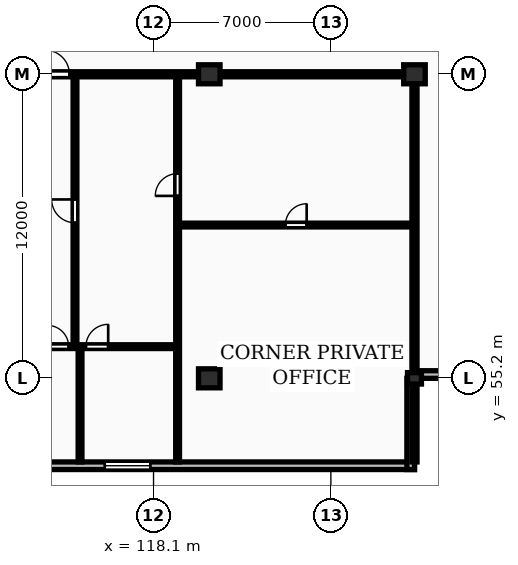
"""IFC4 building model, lengths in metres.
Left out: names, types, materials, properties, quantities, classifications, styles, units other than length and angle.
Written with IfcOpenShell. Run it as: python <this file> out.ifc"""

import sys

from ifc_helpers import new_model, si_unit, direction, frame, frame_2d, origin, origin_2d, place, context, subcontext, project, spatial, rectangle, extrude, element, fill, save


model = new_model("IFC4")
c1 = context("Model", 3, precision=1e-05, world=origin(), true_north=direction((0.0, 1.0)))
c2 = subcontext(c1, "Body", "Model", "MODEL_VIEW")
j1 = project(units=[si_unit("LENGTHUNIT", "METRE"), si_unit("PLANEANGLEUNIT", "RADIAN")], contexts=[c1])
p1 = place(None, origin())
s1 = spatial("IfcSite", under=j1, at=p1, CompositionType="ELEMENT")
p2 = place(p1, origin())
s2 = spatial("IfcBuilding", under=s1, at=p2, CompositionType="ELEMENT")
p3 = place(p2, frame((0.0, 0.0, 210.85)))
s3 = spatial("IfcBuildingStorey", under=s2, at=p3, CompositionType="ELEMENT", Elevation=210.85)
for number, where, z_axis, x_axis in (
    (1, (120.3, 55.2, 0.0), (0.0, 0.0, 1.0), (1.0, 0.0, 0.0)),
    (2, (120.3, 67.2, 0.0), (0.0, 0.0, 1.0), (1.0, 0.0, 0.0)),
):
    element("IfcColumn", number, at=place(p3, frame(where, z_axis=z_axis, x_axis=x_axis)), inside=s3, PredefinedType="COLUMN", context=c2, shape_type="SweptSolid", body=[
        extrude(rectangle(XDim=0.85, YDim=0.75, at=origin_2d()), origin(), (0.0, 0.0, 1.0), 3.25),
    ])
p4 = place(p3, frame((128.4, 55.2, 0.0), z_axis=(0.0, 0.0, 1.0), x_axis=(1.0, 0.0, 0.0)))
e3 = element("IfcColumn", 3, at=p4, inside=s3, PredefinedType="PILASTER", context=c2, shape_type="SweptSolid", body=[
    extrude(rectangle(XDim=0.55, YDim=0.45, at=origin_2d()), origin(), (0.0, 0.0, 1.0), 3.25),
])
p5 = place(p3, frame((128.4, 67.2, 0.0), z_axis=(0.0, 0.0, 1.0), x_axis=(1.0, 0.0, 0.0)))
e4 = element("IfcColumn", 4, at=p5, inside=s3, PredefinedType="COLUMN", context=c2, shape_type="SweptSolid", body=[
    extrude(rectangle(XDim=0.85, YDim=0.75, at=origin_2d()), origin(), (0.0, 0.0, 1.0), 3.25),
])
p6 = place(p3, frame((59.8, 51.75, 0.0), z_axis=(0.0, 0.0, 1.0), x_axis=(1.0, 0.0, 0.0)))
e5 = element("IfcWall", 5, at=p6, inside=s3, PredefinedType="STANDARD", context=c2, shape_type="SweptSolid", body=[
    extrude(rectangle(XDim=68.6, YDim=0.3, at=frame_2d((34.3, 0.0))), origin(), (0.0, 0.0, 1.0), 2.97),
])
p7 = place(p6, frame((13.025, 0.0, 0.85)))
e6 = element("IfcOpeningElement", 6, at=p7, cuts=e5, PredefinedType="OPENING", context=c2, shape_type="SweptSolid", body=[
    extrude(rectangle(XDim=1.8, YDim=1.8, at=frame_2d((0.9, 0.9))), frame((0.0, 0.16, 0.0), z_axis=(0.0, -1.0, 0.0), x_axis=(1.0, 0.0, 0.0)), (0.0, 0.0, 1.0), 0.32),
])
p8 = place(p6, frame((56.375, 0.0, 0.85)))
e7 = element("IfcOpeningElement", 7, at=p8, cuts=e5, PredefinedType="OPENING", context=c2, shape_type="SweptSolid", body=[
    extrude(rectangle(XDim=1.8, YDim=1.8, at=frame_2d((0.9, 0.9))), frame((0.0, 0.16, 0.0), z_axis=(0.0, -1.0, 0.0), x_axis=(1.0, 0.0, 0.0)), (0.0, 0.0, 1.0), 0.32),
])
p9 = place(p3, frame((128.25, 51.6, 0.0), z_axis=(0.0, 0.0, 1.0), x_axis=(0.0, 1.0, 0.0)))
e8 = element("IfcWall", 8, at=p9, inside=s3, PredefinedType="STANDARD", context=c2, shape_type="SweptSolid", body=[
    extrude(rectangle(XDim=3.6, YDim=0.3, at=frame_2d((1.8, 0.0))), origin(), (0.0, 0.0, 1.0), 2.97),
])
p10 = place(p3, frame((128.4, 55.35, 0.0), z_axis=(0.0, 0.0, 1.0), x_axis=(1.0, 0.0, 0.0)))
e9 = element("IfcWall", 9, at=p10, inside=s3, PredefinedType="STANDARD", context=c2, shape_type="SweptSolid", body=[
    extrude(rectangle(XDim=3.6, YDim=0.3, at=frame_2d((1.8, 0.0))), origin(), (0.0, 0.0, 1.0), 2.97),
])
p11 = place(p3, frame((128.4, 51.9, 0.0), z_axis=(0.0, 0.0, 1.0), x_axis=(0.0, 1.0, 0.0)))
e10 = element("IfcWall", 10, at=p11, inside=s3, PredefinedType="PARTITIONING", context=c2, shape_type="SweptSolid", body=[
    extrude(rectangle(XDim=15.3, YDim=0.2, at=frame_2d((7.65, 0.0))), origin(), (0.0, 0.0, 1.0), 2.277),
])
p12 = place(p3, frame((119.05, 61.25, 0.0), z_axis=(0.0, 0.0, 1.0), x_axis=(1.0, 0.0, 0.0)))
e11 = element("IfcWall", 11, at=p12, inside=s3, PredefinedType="PARTITIONING", context=c2, shape_type="SweptSolid", body=[
    extrude(rectangle(XDim=9.35, YDim=0.15, at=frame_2d((4.675, 0.0))), origin(), (0.0, 0.0, 1.0), 2.97),
])
p13 = place(p12, frame((4.255, 0.0, 0.0)))
e12 = element("IfcOpeningElement", 12, at=p13, cuts=e11, PredefinedType="OPENING", context=c2, shape_type="SweptSolid", body=[
    extrude(rectangle(XDim=0.84, YDim=2.04, at=frame_2d((0.42, 1.02))), frame((0.0, 0.085, 0.0), z_axis=(0.0, -1.0, 0.0), x_axis=(1.0, 0.0, 0.0)), (0.0, 0.0, 1.0), 0.17),
])
p14 = place(p3, frame((119.05, 51.9, 0.0), z_axis=(0.0, 0.0, 1.0), x_axis=(0.0, 1.0, 0.0)))
e13 = element("IfcWall", 13, at=p14, inside=s3, PredefinedType="PARTITIONING", context=c2, shape_type="SweptSolid", body=[
    extrude(rectangle(XDim=15.25, YDim=0.15, at=frame_2d((7.625, 0.0))), origin(), (0.0, 0.0, 1.0), 2.97),
])
p15 = place(p14, frame((10.5, 0.0, 0.0)))
e14 = element("IfcOpeningElement", 14, at=p15, cuts=e13, PredefinedType="OPENING", context=c2, shape_type="SweptSolid", body=[
    extrude(rectangle(XDim=0.88, YDim=2.06, at=frame_2d((0.44, 1.03))), frame((0.0, 0.085, 0.0), z_axis=(0.0, -1.0, 0.0), x_axis=(1.0, 0.0, 0.0)), (0.0, 0.0, 1.0), 0.17),
])
p16 = place(p3, frame((115.0, 56.45, 0.0), z_axis=(0.0, 0.0, 1.0), x_axis=(0.0, 1.0, 0.0)))
e15 = element("IfcWall", 15, at=p16, inside=s3, PredefinedType="PARTITIONING", context=c2, shape_type="SweptSolid", body=[
    extrude(rectangle(XDim=10.7, YDim=0.15, at=frame_2d((5.35, 0.0))), origin(), (0.0, 0.0, 1.0), 2.97),
])
p17 = place(p16, frame((4.89, 0.0, 0.0)))
e16 = element("IfcOpeningElement", 16, at=p17, cuts=e15, PredefinedType="OPENING", context=c2, shape_type="SweptSolid", body=[
    extrude(rectangle(XDim=0.92, YDim=2.08, at=frame_2d((0.46, 1.04))), frame((0.0, 0.085, 0.0), z_axis=(0.0, -1.0, 0.0), x_axis=(1.0, 0.0, 0.0)), (0.0, 0.0, 1.0), 0.17),
])
p18 = place(p3, frame((115.2, 51.9, 0.0), z_axis=(0.0, 0.0, 1.0), x_axis=(0.0, 1.0, 0.0)))
e17 = element("IfcWall", 17, at=p18, inside=s3, PredefinedType="PARTITIONING", context=c2, shape_type="SweptSolid", body=[
    extrude(rectangle(XDim=4.55, YDim=0.15, at=frame_2d((2.275, 0.0))), origin(), (0.0, 0.0, 1.0), 2.97),
])
p19 = place(p3, frame((112.27, 56.45, 0.0), z_axis=(0.0, 0.0, 1.0), x_axis=(1.0, 0.0, 0.0)))
e18 = element("IfcWall", 18, at=p19, inside=s3, PredefinedType="PARTITIONING", context=c2, shape_type="SweptSolid", body=[
    extrude(rectangle(XDim=6.76, YDim=0.15, at=frame_2d((3.38, 0.0))), origin(), (0.0, 0.0, 1.0), 2.97),
])
p20 = place(p19, frame((1.64, 0.0, 0.0)))
e19 = element("IfcOpeningElement", 19, at=p20, cuts=e18, PredefinedType="OPENING", context=c2, shape_type="SweptSolid", body=[
    extrude(rectangle(XDim=0.84, YDim=2.04, at=frame_2d((0.42, 1.02))), frame((0.0, 0.085, 0.0), z_axis=(0.0, -1.0, 0.0), x_axis=(1.0, 0.0, 0.0)), (0.0, 0.0, 1.0), 0.17),
])
p21 = place(p19, frame((3.16, 0.0, 0.0)))
e20 = element("IfcOpeningElement", 20, at=p21, cuts=e18, PredefinedType="OPENING", context=c2, shape_type="SweptSolid", body=[
    extrude(rectangle(XDim=0.88, YDim=2.06, at=frame_2d((0.44, 1.03))), frame((0.0, 0.085, 0.0), z_axis=(0.0, -1.0, 0.0), x_axis=(1.0, 0.0, 0.0)), (0.0, 0.0, 1.0), 0.17),
])
p22 = place(p3, frame((112.25, 67.2, 0.0), z_axis=(0.0, 0.0, 1.0), x_axis=(1.0, 0.0, 0.0)))
e21 = element("IfcWall", 21, at=p22, inside=s3, PredefinedType="PARTITIONING", context=c2, shape_type="SweptSolid", body=[
    extrude(rectangle(XDim=16.15, YDim=0.2, at=frame_2d((8.075, 0.0))), origin(), (0.0, 0.0, 1.0), 2.433),
])
p23 = place(p22, frame((1.58, 0.0, 0.0)))
e22 = element("IfcOpeningElement", 22, at=p23, cuts=e21, PredefinedType="OPENING", context=c2, shape_type="SweptSolid", body=[
    extrude(rectangle(XDim=0.95, YDim=2.15, at=frame_2d((0.475, 1.075))), frame((0.0, 0.11, 0.0), z_axis=(0.0, -1.0, 0.0), x_axis=(1.0, 0.0, 0.0)), (0.0, 0.0, 1.0), 0.22),
])
p24 = place(p8, origin())
e23 = element("IfcWindow", 23, at=p24, inside=s3, PartitioningType="SINGLE_PANEL", PredefinedType="WINDOW", context=c2, shape_type="SweptSolid", body=[
    extrude(rectangle(XDim=1.8, YDim=1.8, at=frame_2d((0.9, 0.9))), frame((0.0, 0.03, 0.0), z_axis=(0.0, -1.0, 0.0), x_axis=(1.0, 0.0, 0.0)), (0.0, 0.0, 1.0), 0.06),
])
fill(e7, e23)
p25 = place(p13, origin())
e24 = element("IfcDoor", 24, at=p25, inside=s3, OperationType="SINGLE_SWING_RIGHT", PredefinedType="DOOR", context=c2, shape_type="SweptSolid", body=[
    extrude(rectangle(XDim=0.84, YDim=2.04, at=frame_2d((0.42, 1.02))), frame((0.0, 0.025, 0.0), z_axis=(0.0, -1.0, 0.0), x_axis=(1.0, 0.0, 0.0)), (0.0, 0.0, 1.0), 0.05),
])
fill(e12, e24)
p26 = place(p15, origin())
e25 = element("IfcDoor", 25, at=p26, inside=s3, OperationType="SINGLE_SWING_LEFT", PredefinedType="DOOR", context=c2, shape_type="SweptSolid", body=[
    extrude(rectangle(XDim=0.88, YDim=2.06, at=frame_2d((0.44, 1.03))), frame((0.0, 0.025, 0.0), z_axis=(0.0, -1.0, 0.0), x_axis=(1.0, 0.0, 0.0)), (0.0, 0.0, 1.0), 0.05),
])
fill(e14, e25)
p27 = place(p17, origin())
e26 = element("IfcDoor", 26, at=p27, inside=s3, OperationType="SINGLE_SWING_RIGHT", PredefinedType="DOOR", context=c2, shape_type="SweptSolid", body=[
    extrude(rectangle(XDim=0.92, YDim=2.08, at=frame_2d((0.46, 1.04))), frame((0.0, 0.025, 0.0), z_axis=(0.0, -1.0, 0.0), x_axis=(1.0, 0.0, 0.0)), (0.0, 0.0, 1.0), 0.05),
])
fill(e16, e26)
p28 = place(p20, origin())
e27 = element("IfcDoor", 27, at=p28, inside=s3, OperationType="SINGLE_SWING_LEFT", PredefinedType="DOOR", context=c2, shape_type="SweptSolid", body=[
    extrude(rectangle(XDim=0.84, YDim=2.04, at=frame_2d((0.42, 1.02))), frame((0.0, 0.025, 0.0), z_axis=(0.0, -1.0, 0.0), x_axis=(1.0, 0.0, 0.0)), (0.0, 0.0, 1.0), 0.05),
])
fill(e19, e27)
p29 = place(p21, origin())
e28 = element("IfcDoor", 28, at=p29, inside=s3, OperationType="SINGLE_SWING_RIGHT", PredefinedType="DOOR", context=c2, shape_type="SweptSolid", body=[
    extrude(rectangle(XDim=0.88, YDim=2.06, at=frame_2d((0.44, 1.03))), frame((0.0, 0.025, 0.0), z_axis=(0.0, -1.0, 0.0), x_axis=(1.0, 0.0, 0.0)), (0.0, 0.0, 1.0), 0.05),
])
fill(e20, e28)
p30 = place(p23, origin())
e29 = element("IfcDoor", 29, at=p30, inside=s3, OperationType="SINGLE_SWING_LEFT", PredefinedType="DOOR", context=c2, shape_type="SweptSolid", body=[
    extrude(rectangle(XDim=0.95, YDim=2.15, at=frame_2d((0.475, 1.075))), frame((0.0, 0.025, 0.0), z_axis=(0.0, -1.0, 0.0), x_axis=(1.0, 0.0, 0.0)), (0.0, 0.0, 1.0), 0.05),
])
fill(e22, e29)
save(model, sys.argv[1])
